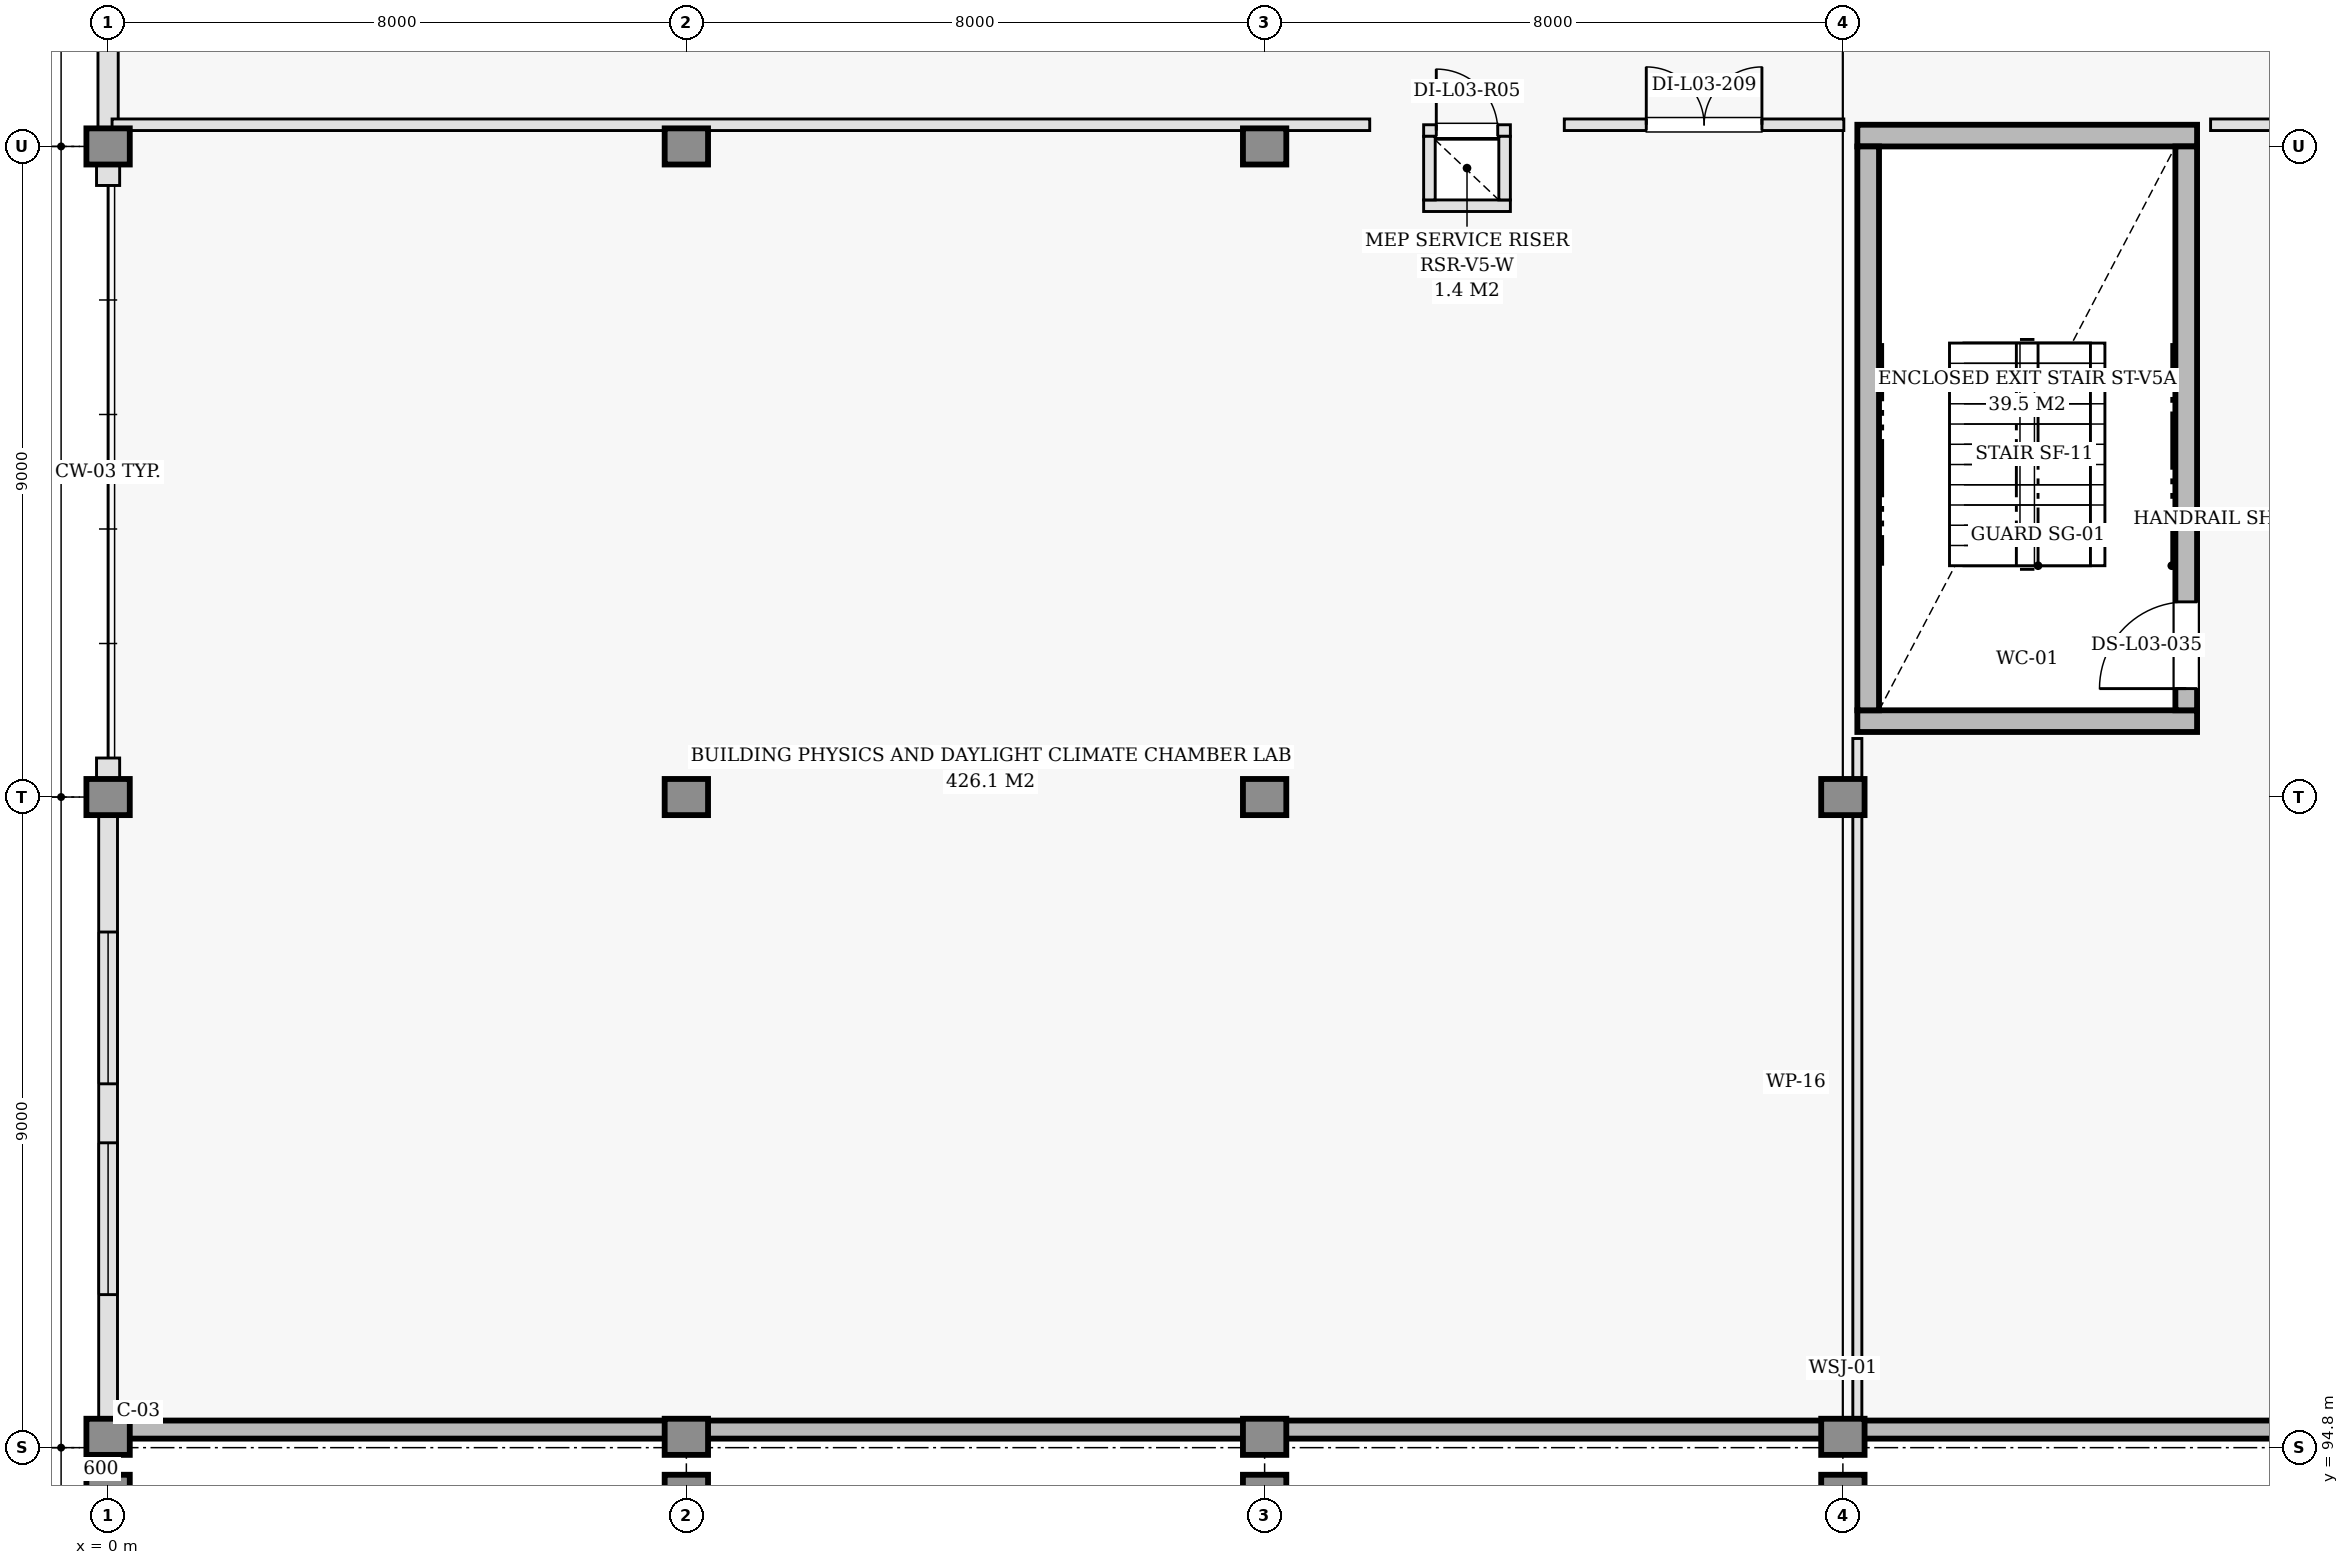
"""IFC4 building model, lengths in metres.
Left out: names, types, materials, properties, quantities, classifications, styles, units other than length and angle.
Written with IfcOpenShell. Run it as: python <this file> out.ifc"""

import sys

from ifc_helpers import new_model, si_unit, direction, frame, frame_2d, origin, origin_2d, place, context, subcontext, project, spatial, rectangle, extrude, element, fill, save


model = new_model("IFC4")
c1 = context("Model", 3, precision=1e-05, world=origin(), true_north=direction((0.0, 1.0)))
c2 = subcontext(c1, "Body", "Model", "MODEL_VIEW")
j1 = project(units=[si_unit("LENGTHUNIT", "METRE"), si_unit("PLANEANGLEUNIT", "RADIAN")], contexts=[c1])
p1 = place(None, origin())
s1 = spatial("IfcSite", under=j1, at=p1, CompositionType="ELEMENT")
p2 = place(p1, origin())
s2 = spatial("IfcBuilding", under=s1, at=p2, CompositionType="ELEMENT")
p3 = place(p2, frame((0.0, 0.0, 13.8)))
s3 = spatial("IfcBuildingStorey", under=s2, at=p3, CompositionType="ELEMENT", Elevation=13.8)
for number, where, z_axis, x_axis in (
    (1, (0.0, 94.95, 0.0), (0.0, 0.0, 1.0), (1.0, 0.0, 0.0)),
    (2, (0.0, 103.8, 0.0), (0.0, 0.0, 1.0), (1.0, 0.0, 0.0)),
    (3, (0.0, 112.8, 0.0), (0.0, 0.0, 1.0), (1.0, 0.0, 0.0)),
    (4, (8.0, 94.95, 0.0), (0.0, 0.0, 1.0), (1.0, 0.0, 0.0)),
    (5, (8.0, 103.8, 0.0), (0.0, 0.0, 1.0), (1.0, 0.0, 0.0)),
    (6, (8.0, 112.8, 0.0), (0.0, 0.0, 1.0), (1.0, 0.0, 0.0)),
    (7, (16.0, 94.95, 0.0), (0.0, 0.0, 1.0), (1.0, 0.0, 0.0)),
    (8, (16.0, 103.8, 0.0), (0.0, 0.0, 1.0), (1.0, 0.0, 0.0)),
    (9, (16.0, 112.8, 0.0), (0.0, 0.0, 1.0), (1.0, 0.0, 0.0)),
    (10, (24.0, 94.95, 0.0), (0.0, 0.0, 1.0), (1.0, 0.0, 0.0)),
    (11, (24.0, 103.8, 0.0), (0.0, 0.0, 1.0), (1.0, 0.0, 0.0)),
):
    element("IfcColumn", number, at=place(p3, frame(where, z_axis=z_axis, x_axis=x_axis)), inside=s3, PredefinedType="COLUMN", context=c2, shape_type="SweptSolid", body=[
        extrude(rectangle(XDim=0.5, YDim=0.5, at=origin_2d()), origin(), (0.0, 0.0, 1.0), 4.2),
    ])
for number, where, z_axis, x_axis in (
    (12, (0.0, 94.2, 0.0), (0.0, 0.0, 1.0), (1.0, 0.0, 0.0)),
    (13, (8.0, 94.2, 0.0), (0.0, 0.0, 1.0), (1.0, 0.0, 0.0)),
    (14, (16.0, 94.2, 0.0), (0.0, 0.0, 1.0), (1.0, 0.0, 0.0)),
    (15, (24.0, 94.2, 0.0), (0.0, 0.0, 1.0), (1.0, 0.0, 0.0)),
):
    element("IfcColumn", number, at=place(p3, frame(where, z_axis=z_axis, x_axis=x_axis)), inside=s3, PredefinedType="COLUMN", context=c2, shape_type="SweptSolid", body=[
        extrude(rectangle(XDim=0.45, YDim=0.45, at=origin_2d()), origin(), (0.0, 0.0, 1.0), 4.2),
    ])
p4 = place(p3, frame((0.0, 95.05, 0.0), z_axis=(0.0, 0.0, 1.0), x_axis=(1.0, 0.0, 0.0)))
e16 = element("IfcWall", 16, at=p4, inside=s3, PredefinedType="SHEAR", context=c2, shape_type="SweptSolid", body=[
    extrude(rectangle(XDim=48.0, YDim=0.25, at=frame_2d((24.0, 0.0))), origin(), (0.0, 0.0, 1.0), 3.96),
])
p5 = place(p3, frame((0.0, 121.8, 0.0), z_axis=(0.0, 0.0, 1.0), x_axis=(0.0, -1.0, 0.0)))
e17 = element("IfcWall", 17, at=p5, inside=s3, PredefinedType="SOLIDWALL", context=c2, shape_type="SweptSolid", body=[
    extrude(rectangle(XDim=9.0, YDim=0.28, at=frame_2d((4.5, 0.0))), origin(), (0.0, 0.0, 1.0), 3.195),
])
p6 = place(p5, frame((1.875, 0.0, 0.95)))
e18 = element("IfcOpeningElement", 18, at=p6, cuts=e17, PredefinedType="OPENING", context=c2, shape_type="SweptSolid", body=[
    extrude(rectangle(XDim=2.25, YDim=1.8, at=frame_2d((1.125, 0.9))), frame((0.0, 0.15, 0.0), z_axis=(0.0, -1.0, 0.0), x_axis=(1.0, 0.0, 0.0)), (0.0, 0.0, 1.0), 0.3),
])
for number, where, z_axis, x_axis in (
    (19, (0.0, 112.8, 0.0), (0.0, 0.0, 1.0), (0.0, -1.0, 0.0)),
    (20, (0.0, 104.34, 0.0), (0.0, 0.0, 1.0), (0.0, -1.0, 0.0)),
):
    element("IfcWall", number, at=place(p3, frame(where, z_axis=z_axis, x_axis=x_axis)), inside=s3, PredefinedType="SOLIDWALL", context=c2, shape_type="SweptSolid", body=[
        extrude(rectangle(XDim=0.54, YDim=0.32, at=frame_2d((0.27, 0.0))), origin(), (0.0, 0.0, 1.0), 3.195),
    ])
p7 = place(p3, frame((0.0, 103.8, 0.0), z_axis=(0.0, 0.0, 1.0), x_axis=(0.0, -1.0, 0.0)))
e21 = element("IfcWall", 21, at=p7, inside=s3, PredefinedType="SOLIDWALL", context=c2, shape_type="SweptSolid", body=[
    extrude(rectangle(XDim=8.75, YDim=0.26, at=frame_2d((4.375, 0.0))), origin(), (0.0, 0.0, 1.0), 3.195),
])
p8 = place(p7, frame((1.867, 0.0, 0.95)))
e22 = element("IfcOpeningElement", 22, at=p8, cuts=e21, PredefinedType="OPENING", context=c2, shape_type="SweptSolid", body=[
    extrude(rectangle(XDim=2.1, YDim=1.8, at=frame_2d((1.05, 0.9))), frame((0.0, 0.14, 0.0), z_axis=(0.0, -1.0, 0.0), x_axis=(1.0, 0.0, 0.0)), (0.0, 0.0, 1.0), 0.28),
])
p9 = place(p7, frame((4.783, 0.0, 0.95)))
e23 = element("IfcOpeningElement", 23, at=p9, cuts=e21, PredefinedType="OPENING", context=c2, shape_type="SweptSolid", body=[
    extrude(rectangle(XDim=2.1, YDim=1.8, at=frame_2d((1.05, 0.9))), frame((0.0, 0.14, 0.0), z_axis=(0.0, -1.0, 0.0), x_axis=(1.0, 0.0, 0.0)), (0.0, 0.0, 1.0), 0.28),
])
for number, where, z_axis, x_axis in (
    (24, (24.2, 104.85, 0.0), (0.0, 0.0, 1.0), (1.0, 0.0, 0.0)),
    (25, (24.2, 112.95, 0.0), (0.0, 0.0, 1.0), (1.0, 0.0, 0.0)),
):
    element("IfcWall", number, at=place(p3, frame(where, z_axis=z_axis, x_axis=x_axis)), inside=s3, PredefinedType="SHEAR", context=c2, shape_type="SweptSolid", body=[
        extrude(rectangle(XDim=4.7, YDim=0.3, at=frame_2d((2.35, 0.0))), origin(), (0.0, 0.0, 1.0), 3.96),
    ])
p10 = place(p3, frame((24.35, 105.0, 0.0), z_axis=(0.0, 0.0, 1.0), x_axis=(0.0, 1.0, 0.0)))
e26 = element("IfcWall", 26, at=p10, inside=s3, PredefinedType="SHEAR", context=c2, shape_type="SweptSolid", body=[
    extrude(rectangle(XDim=7.8, YDim=0.3, at=frame_2d((3.9, 0.0))), origin(), (0.0, 0.0, 1.0), 3.96),
])
p11 = place(p3, frame((28.75, 105.0, 0.0), z_axis=(0.0, 0.0, 1.0), x_axis=(0.0, 1.0, 0.0)))
e27 = element("IfcWall", 27, at=p11, inside=s3, PredefinedType="SHEAR", context=c2, shape_type="SweptSolid", body=[
    extrude(rectangle(XDim=7.8, YDim=0.3, at=frame_2d((3.9, 0.0))), origin(), (0.0, 0.0, 1.0), 3.96),
])
p12 = place(p11, frame((0.3, 0.0, 0.0)))
e28 = element("IfcOpeningElement", 28, at=p12, cuts=e27, PredefinedType="OPENING", context=c2, shape_type="SweptSolid", body=[
    extrude(rectangle(XDim=1.2, YDim=2.15, at=frame_2d((0.6, 1.075))), frame((0.0, 0.16, 0.0), z_axis=(0.0, -1.0, 0.0), x_axis=(1.0, 0.0, 0.0)), (0.0, 0.0, 1.0), 0.32),
])
p13 = place(p3, frame((18.2, 111.98, 0.0), z_axis=(0.0, 0.0, 1.0), x_axis=(1.0, 0.0, 0.0)))
e29 = element("IfcWall", 29, at=p13, inside=s3, PredefinedType="PARTITIONING", context=c2, shape_type="SweptSolid", body=[
    extrude(rectangle(XDim=1.2, YDim=0.16, at=frame_2d((0.6, 0.0))), origin(), (0.0, 0.0, 1.0), 3.96),
])
p14 = place(p3, frame((18.2, 113.02, 0.0), z_axis=(0.0, 0.0, 1.0), x_axis=(1.0, 0.0, 0.0)))
e30 = element("IfcWall", 30, at=p14, inside=s3, PredefinedType="PARTITIONING", context=c2, shape_type="SweptSolid", body=[
    extrude(rectangle(XDim=1.2, YDim=0.16, at=frame_2d((0.6, 0.0))), origin(), (0.0, 0.0, 1.0), 3.96),
])
p15 = place(p14, frame((0.175, 0.0, 0.0)))
e31 = element("IfcOpeningElement", 31, at=p15, cuts=e30, PredefinedType="OPENING", context=c2, shape_type="SweptSolid", body=[
    extrude(rectangle(XDim=0.85, YDim=2.02, at=frame_2d((0.425, 1.01))), frame((0.0, 0.09, 0.0), z_axis=(0.0, -1.0, 0.0), x_axis=(1.0, 0.0, 0.0)), (0.0, 0.0, 1.0), 0.18),
])
for number, where, z_axis, x_axis in (
    (32, (18.28, 112.06, 0.0), (0.0, 0.0, 1.0), (0.0, 1.0, 0.0)),
    (33, (19.32, 112.06, 0.0), (0.0, 0.0, 1.0), (0.0, 1.0, 0.0)),
):
    element("IfcWall", number, at=place(p3, frame(where, z_axis=z_axis, x_axis=x_axis)), inside=s3, PredefinedType="PARTITIONING", context=c2, shape_type="SweptSolid", body=[
        extrude(rectangle(XDim=0.88, YDim=0.16, at=frame_2d((0.44, 0.0))), origin(), (0.0, 0.0, 1.0), 3.96),
    ])
p16 = place(p3, frame((20.146, 113.1, 0.0), z_axis=(0.0, 0.0, 1.0), x_axis=(1.0, 0.0, 0.0)))
e34 = element("IfcWall", 34, at=p16, inside=s3, PredefinedType="PARTITIONING", context=c2, shape_type="SweptSolid", body=[
    extrude(rectangle(XDim=3.867, YDim=0.16, at=frame_2d((1.934, 0.0))), origin(), (0.0, 0.0, 1.0), 3.96),
])
p17 = place(p16, frame((1.134, 0.0, 0.0)))
e35 = element("IfcOpeningElement", 35, at=p17, cuts=e34, PredefinedType="OPENING", context=c2, shape_type="SweptSolid", body=[
    extrude(rectangle(XDim=1.6, YDim=2.2, at=frame_2d((0.8, 1.1))), frame((0.0, 0.09, 0.0), z_axis=(0.0, -1.0, 0.0), x_axis=(1.0, 0.0, 0.0)), (0.0, 0.0, 1.0), 0.18),
])
p18 = place(p3, frame((0.055, 113.1, 0.0), z_axis=(0.0, 0.0, 1.0), x_axis=(1.0, 0.0, 0.0)))
e36 = element("IfcWall", 36, at=p18, inside=s3, PredefinedType="PARTITIONING", context=c2, shape_type="SweptSolid", body=[
    extrude(rectangle(XDim=17.399, YDim=0.16, at=frame_2d((8.7, 0.0))), origin(), (0.0, 0.0, 1.0), 3.195),
])
p19 = place(p3, frame((24.2, 95.105, 0.0), z_axis=(0.0, 0.0, 1.0), x_axis=(0.0, 1.0, 0.0)))
e37 = element("IfcWall", 37, at=p19, inside=s3, PredefinedType="PARTITIONING", context=c2, shape_type="SweptSolid", body=[
    extrude(rectangle(XDim=9.505, YDim=0.125, at=frame_2d((4.752, 0.0))), origin(), (0.0, 0.0, 1.0), 3.195),
])
p20 = place(p3, frame((29.087, 113.1, 0.0), z_axis=(0.0, 0.0, 1.0), x_axis=(1.0, 0.0, 0.0)))
e38 = element("IfcWall", 38, at=p20, inside=s3, PredefinedType="PARTITIONING", context=c2, shape_type="SweptSolid", body=[
    extrude(rectangle(XDim=2.873, YDim=0.16, at=frame_2d((1.437, 0.0))), origin(), (0.0, 0.0, 1.0), 3.295),
])
p21 = place(p8, origin())
e39 = element("IfcWindow", 39, at=p21, inside=s3, PartitioningType="DOUBLE_PANEL_VERTICAL", PredefinedType="WINDOW", context=c2, shape_type="SweptSolid", body=[
    extrude(rectangle(XDim=2.1, YDim=1.8, at=frame_2d((1.05, 0.9))), frame((0.0, 0.03, 0.0), z_axis=(0.0, -1.0, 0.0), x_axis=(1.0, 0.0, 0.0)), (0.0, 0.0, 1.0), 0.06),
])
fill(e22, e39)
p22 = place(p9, origin())
e40 = element("IfcWindow", 40, at=p22, inside=s3, PartitioningType="DOUBLE_PANEL_VERTICAL", PredefinedType="WINDOW", context=c2, shape_type="SweptSolid", body=[
    extrude(rectangle(XDim=2.1, YDim=1.8, at=frame_2d((1.05, 0.9))), frame((0.0, 0.03, 0.0), z_axis=(0.0, -1.0, 0.0), x_axis=(1.0, 0.0, 0.0)), (0.0, 0.0, 1.0), 0.06),
])
fill(e23, e40)
p23 = place(p12, origin())
e41 = element("IfcDoor", 41, at=p23, inside=s3, OperationType="SINGLE_SWING_LEFT", PredefinedType="DOOR", context=c2, shape_type="SweptSolid", body=[
    extrude(rectangle(XDim=1.2, YDim=2.15, at=frame_2d((0.6, 1.075))), frame((0.0, 0.025, 0.0), z_axis=(0.0, -1.0, 0.0), x_axis=(1.0, 0.0, 0.0)), (0.0, 0.0, 1.0), 0.05),
])
fill(e28, e41)
p24 = place(p15, origin())
e42 = element("IfcDoor", 42, at=p24, inside=s3, OperationType="SINGLE_SWING_LEFT", PredefinedType="DOOR", context=c2, shape_type="SweptSolid", body=[
    extrude(rectangle(XDim=0.85, YDim=2.02, at=frame_2d((0.425, 1.01))), frame((0.0, 0.025, 0.0), z_axis=(0.0, -1.0, 0.0), x_axis=(1.0, 0.0, 0.0)), (0.0, 0.0, 1.0), 0.05),
])
fill(e31, e42)
p25 = place(p17, origin())
e43 = element("IfcDoor", 43, at=p25, inside=s3, OperationType="DOUBLE_DOOR_SINGLE_SWING", PredefinedType="DOOR", context=c2, shape_type="SweptSolid", body=[
    extrude(rectangle(XDim=1.6, YDim=2.2, at=frame_2d((0.8, 1.1))), frame((0.0, 0.025, 0.0), z_axis=(0.0, -1.0, 0.0), x_axis=(1.0, 0.0, 0.0)), (0.0, 0.0, 1.0), 0.05),
])
fill(e35, e43)
save(model, sys.argv[1])
